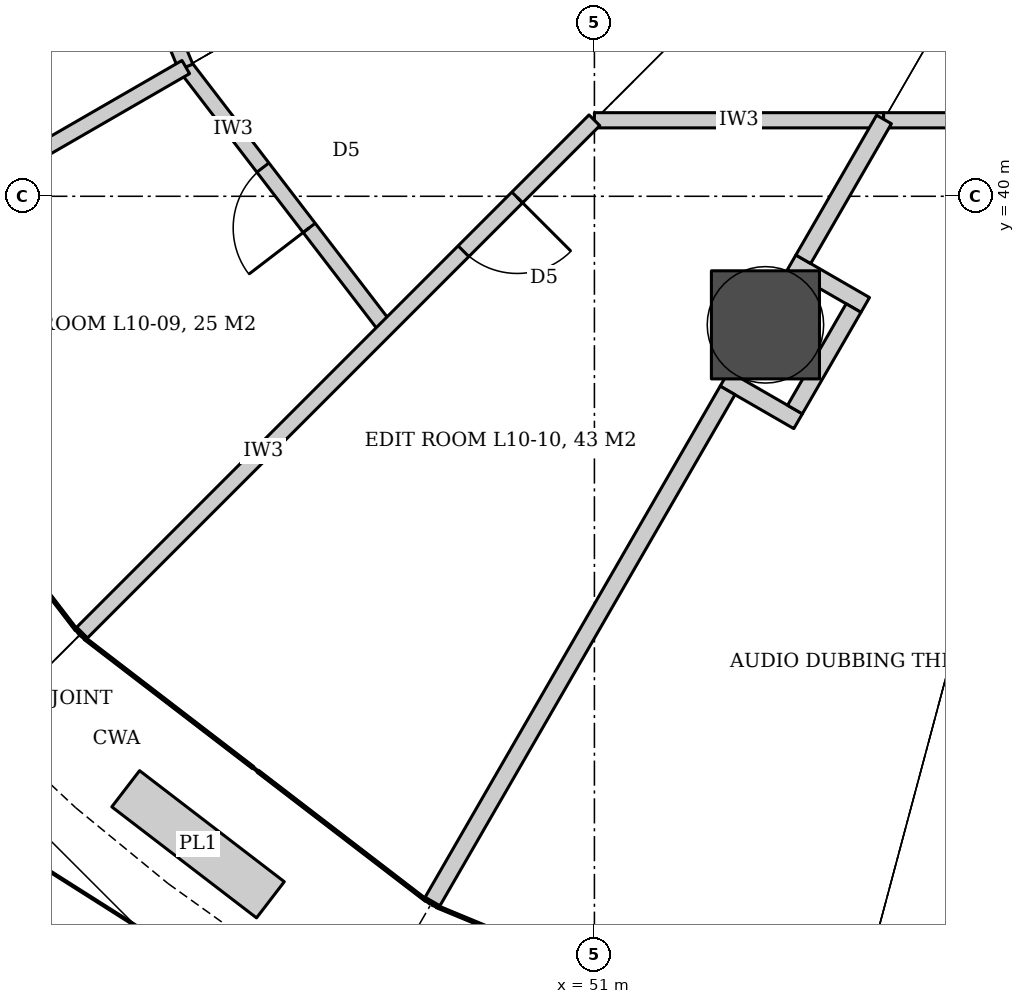
"""IFC4 building model, lengths in metres.
Left out: names, types, materials, properties, quantities, classifications, styles, units other than length and angle.
Written with IfcOpenShell. Run it as: python <this file> out.ifc"""

import sys

from ifc_helpers import new_model, si_unit, direction, frame, frame_2d, origin, origin_2d, place, context, subcontext, project, spatial, rectangle, hollow_circle, extrude, element, fill, save


model = new_model("IFC4")
c1 = context("Model", 3, precision=1e-05, world=origin(), true_north=direction((0.0, 1.0)))
c2 = subcontext(c1, "Body", "Model", "MODEL_VIEW")
j1 = project(units=[si_unit("LENGTHUNIT", "METRE"), si_unit("PLANEANGLEUNIT", "RADIAN")], contexts=[c1])
p1 = place(None, origin())
s1 = spatial("IfcSite", under=j1, at=p1, CompositionType="ELEMENT")
p2 = place(p1, origin())
s2 = spatial("IfcBuilding", under=s1, at=p2, CompositionType="ELEMENT")
p3 = place(p2, frame((0.0, 0.0, 42.8)))
s3 = spatial("IfcBuildingStorey", under=s2, at=p3, CompositionType="ELEMENT", Elevation=42.8)
p4 = place(p3, frame((53.25, 38.309, 0.0), z_axis=(0.0, 0.0, 1.0), x_axis=(1.0, 0.0, 0.0)))
e1 = element("IfcColumn", 1, at=p4, inside=s3, PredefinedType="COLUMN", context=c2, shape_type="SweptSolid", body=[
    extrude(hollow_circle(Radius=0.813, WallThickness=0.08, at=origin_2d()), origin(), (0.0, 0.0, 1.0), 4.2),
])
p5 = place(p3, frame((48.262, 38.262, 0.0), z_axis=(0.0, 0.0, 1.0), x_axis=(-0.60874374674, 0.79336690806, 0.0)))
e2 = element("IfcWall", 2, at=p5, inside=s3, PredefinedType="PARTITIONING", context=c2, shape_type="SweptSolid", body=[
    extrude(rectangle(XDim=4.333, YDim=0.2, at=frame_2d((2.167, 0.0))), origin(), (0.0, 0.0, 1.0), 3.04),
])
p6 = place(p5, frame((1.667, 0.0, 0.0)))
e3 = element("IfcOpeningElement", 3, at=p6, cuts=e2, PredefinedType="OPENING", context=c2, shape_type="SweptSolid", body=[
    extrude(rectangle(XDim=1.0, YDim=2.1, at=frame_2d((0.5, 1.05))), frame((0.0, 0.11, 0.0), z_axis=(0.0, -1.0, 0.0), x_axis=(1.0, 0.0, 0.0)), (0.0, 0.0, 1.0), 0.22),
])
p7 = place(p3, frame((45.624, 41.7, 0.0), z_axis=(0.0, 0.0, 1.0), x_axis=(-0.382698425325, 0.923873322082, 0.0)))
e4 = element("IfcWall", 4, at=p7, inside=s3, PredefinedType="PARTITIONING", context=c2, shape_type="SweptSolid", body=[
    extrude(rectangle(XDim=4.333, YDim=0.2, at=frame_2d((2.167, 0.0))), origin(), (0.0, 0.0, 1.0), 3.04),
])
p8 = place(p7, frame((1.667, 0.0, 0.0)))
e5 = element("IfcOpeningElement", 5, at=p8, cuts=e4, PredefinedType="OPENING", context=c2, shape_type="SweptSolid", body=[
    extrude(rectangle(XDim=1.0, YDim=2.1, at=frame_2d((0.5, 1.05))), frame((0.0, 0.11, 0.0), z_axis=(0.0, -1.0, 0.0), x_axis=(1.0, 0.0, 0.0)), (0.0, 0.0, 1.0), 0.22),
])
p9 = place(p3, frame((60.0, 41.0, 0.0), z_axis=(0.0, 0.0, 1.0), x_axis=(-1.0, 0.0, 0.0)))
e6 = element("IfcWall", 6, at=p9, inside=s3, PredefinedType="PARTITIONING", context=c2, shape_type="SweptSolid", body=[
    extrude(rectangle(XDim=5.196, YDim=0.2, at=frame_2d((2.598, 0.0))), origin(), (0.0, 0.0, 1.0), 3.04),
])
p10 = place(p9, frame((1.698, 0.0, 0.0)))
e7 = element("IfcOpeningElement", 7, at=p10, cuts=e6, PredefinedType="OPENING", context=c2, shape_type="SweptSolid", body=[
    extrude(rectangle(XDim=1.8, YDim=2.7, at=frame_2d((0.9, 1.35))), frame((0.0, 0.11, 0.0), z_axis=(0.0, -1.0, 0.0), x_axis=(1.0, 0.0, 0.0)), (0.0, 0.0, 1.0), 0.22),
])
p11 = place(p3, frame((54.804, 41.0, 0.0), z_axis=(0.0, 0.0, 1.0), x_axis=(-1.0, 0.0, 0.0)))
e8 = element("IfcWall", 8, at=p11, inside=s3, PredefinedType="PARTITIONING", context=c2, shape_type="SweptSolid", body=[
    extrude(rectangle(XDim=3.804, YDim=0.2, at=frame_2d((1.902, 0.0))), origin(), (0.0, 0.0, 1.0), 3.02),
])
p12 = place(p3, frame((45.624, 41.7, 0.0), z_axis=(0.0, 0.0, 1.0), x_axis=(-0.866042189445, -0.499970925255, 0.0)))
e9 = element("IfcWall", 9, at=p12, inside=s3, PredefinedType="PARTITIONING", context=c2, shape_type="SweptSolid", body=[
    extrude(rectangle(XDim=5.16, YDim=0.2, at=frame_2d((2.58, 0.0))), origin(), (0.0, 0.0, 1.0), 3.04),
])
p13 = place(p3, frame((51.0, 41.0, 0.0), z_axis=(0.0, 0.0, 1.0), x_axis=(-0.707106781187, -0.707106781187, 0.0)))
e10 = element("IfcWall", 10, at=p13, inside=s3, PredefinedType="PARTITIONING", context=c2, shape_type="SweptSolid", body=[
    extrude(rectangle(XDim=9.032, YDim=0.2, at=frame_2d((4.516, 0.0))), origin(), (0.0, 0.0, 1.0), 3.02),
])
p14 = place(p13, frame((1.436, 0.0, 0.0)))
e11 = element("IfcOpeningElement", 11, at=p14, cuts=e10, PredefinedType="OPENING", context=c2, shape_type="SweptSolid", body=[
    extrude(rectangle(XDim=1.0, YDim=2.1, at=frame_2d((0.5, 1.05))), frame((0.0, 0.11, 0.0), z_axis=(0.0, -1.0, 0.0), x_axis=(1.0, 0.0, 0.0)), (0.0, 0.0, 1.0), 0.22),
])
p15 = place(p3, frame((53.645, 39.219, 0.0), z_axis=(0.0, 0.0, 1.0), x_axis=(0.866019052629, -0.500011000363, 0.0)))
e12 = element("IfcWall", 12, at=p15, inside=s3, PredefinedType="PARTITIONING", context=c2, shape_type="SweptSolid", body=[
    extrude(rectangle(XDim=1.221, YDim=0.225, at=frame_2d((0.61, 0.0))), origin(), (0.0, 0.0, 1.0), 3.02),
])
p16 = place(p3, frame((52.66, 37.511, 0.0), z_axis=(0.0, 0.0, 1.0), x_axis=(0.865969036334, -0.500097618581, 0.0)))
e13 = element("IfcWall", 13, at=p16, inside=s3, PredefinedType="PARTITIONING", context=c2, shape_type="SweptSolid", body=[
    extrude(rectangle(XDim=1.22, YDim=0.225, at=frame_2d((0.61, 0.0))), origin(), (0.0, 0.0, 1.0), 3.02),
])
p17 = place(p3, frame((54.549, 38.567, 0.0), z_axis=(0.0, 0.0, 1.0), x_axis=(-0.500049268192, -0.865996956912, 0.0)))
e14 = element("IfcWall", 14, at=p17, inside=s3, PredefinedType="PARTITIONING", context=c2, shape_type="SweptSolid", body=[
    extrude(rectangle(XDim=1.746, YDim=0.225, at=frame_2d((0.873, 0.0))), origin(), (0.0, 0.0, 1.0), 3.02),
])
p18 = place(p3, frame((54.81, 41.011, 0.0), z_axis=(0.0, 0.0, 1.0), x_axis=(-0.499969802211, -0.866042837784, 0.0)))
e15 = element("IfcWall", 15, at=p18, inside=s3, PredefinedType="PARTITIONING", context=c2, shape_type="SweptSolid", body=[
    extrude(rectangle(XDim=2.022, YDim=0.225, at=frame_2d((1.011, 0.0))), origin(), (0.0, 0.0, 1.0), 3.04),
])
p19 = place(p3, frame((52.701, 37.358, 0.0), z_axis=(0.0, 0.0, 1.0), x_axis=(-0.499970319043, -0.866042539415, 0.0)))
e16 = element("IfcWall", 16, at=p19, inside=s3, PredefinedType="PARTITIONING", context=c2, shape_type="SweptSolid", body=[
    extrude(rectangle(XDim=7.162, YDim=0.225, at=frame_2d((3.581, 0.0))), origin(), (0.0, 0.0, 1.0), 3.04),
])
p20 = place(p6, origin())
e17 = element("IfcDoor", 17, at=p20, inside=s3, OperationType="SINGLE_SWING_LEFT", PredefinedType="DOOR", context=c2, shape_type="SweptSolid", body=[
    extrude(rectangle(XDim=1.0, YDim=2.1, at=frame_2d((0.5, 1.05))), frame((0.0, 0.025, 0.0), z_axis=(0.0, -1.0, 0.0), x_axis=(1.0, 0.0, 0.0)), (0.0, 0.0, 1.0), 0.05),
])
fill(e3, e17)
p21 = place(p14, origin())
e18 = element("IfcDoor", 18, at=p21, inside=s3, OperationType="SINGLE_SWING_LEFT", PredefinedType="DOOR", context=c2, shape_type="SweptSolid", body=[
    extrude(rectangle(XDim=1.0, YDim=2.1, at=frame_2d((0.5, 1.05))), frame((0.0, 0.025, 0.0), z_axis=(0.0, -1.0, 0.0), x_axis=(1.0, 0.0, 0.0)), (0.0, 0.0, 1.0), 0.05),
])
fill(e11, e18)
save(model, sys.argv[1])
